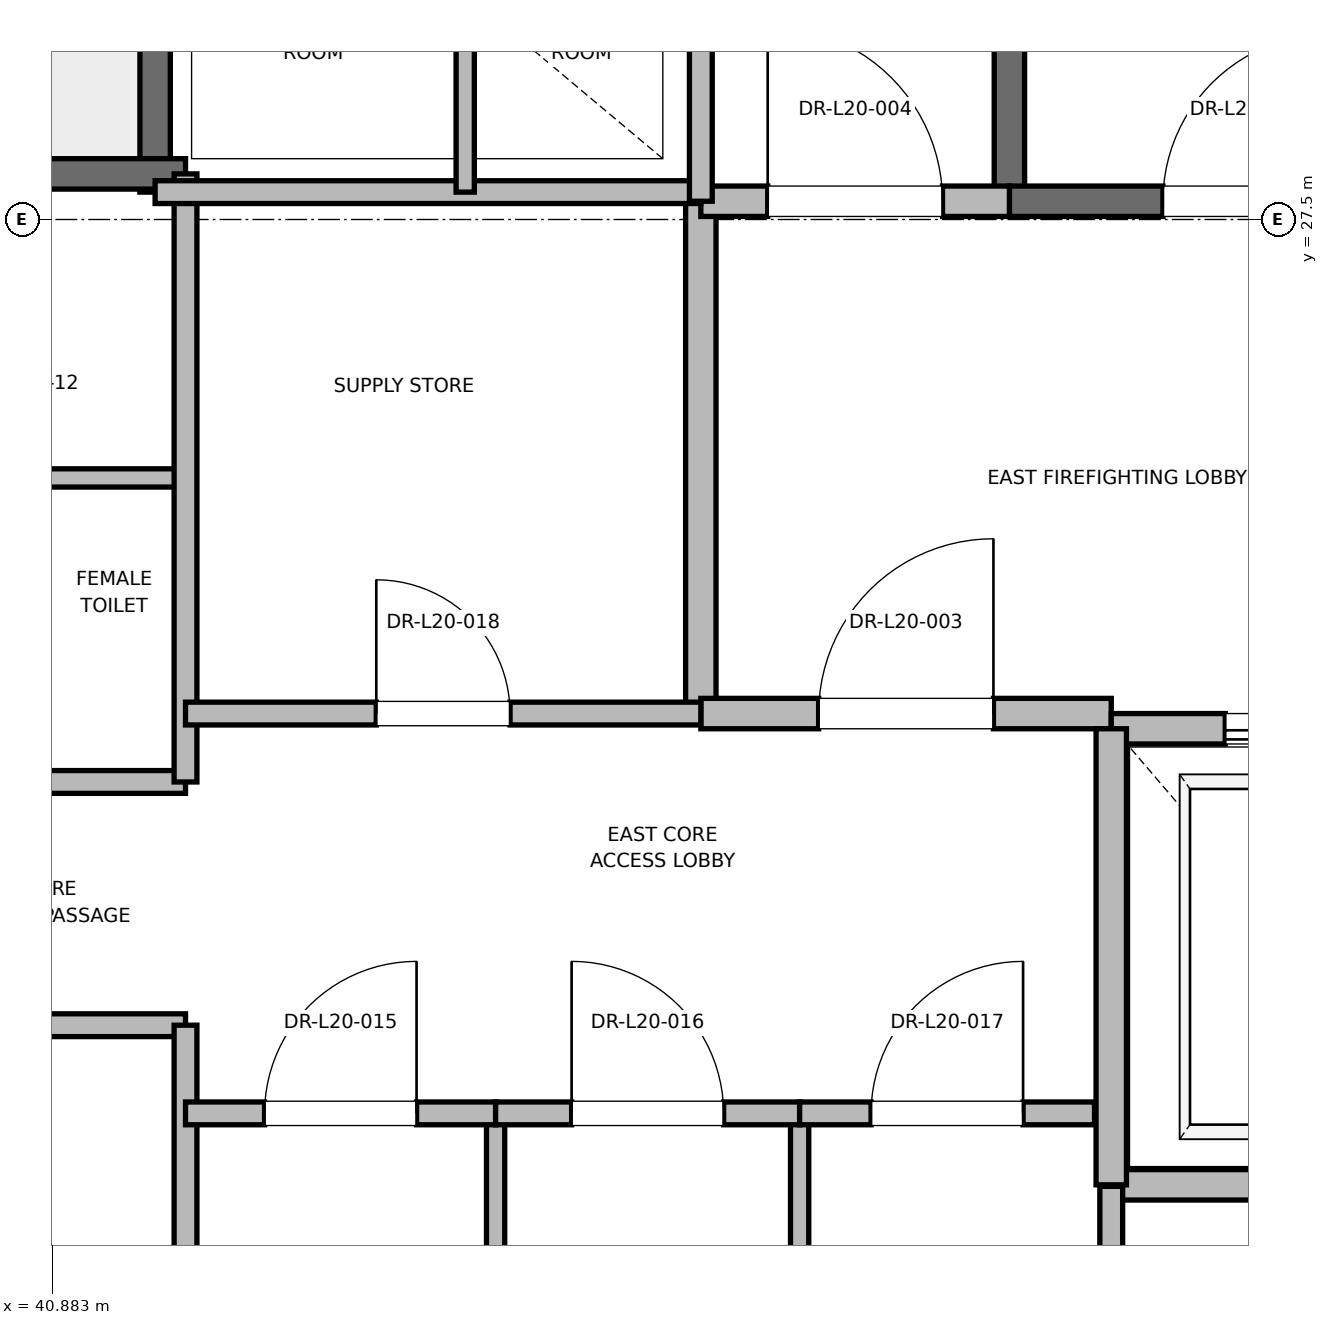
"""IFC4 building model, lengths in metres.
Left out: names, types, materials, properties, quantities, classifications, styles, units other than length and angle.
Written with IfcOpenShell. Run it as: python <this file> out.ifc"""

import sys

from ifc_helpers import new_model, si_unit, direction, frame, frame_2d, origin, place, context, subcontext, project, spatial, rectangle, extrude, element, fill, save


model = new_model("IFC4")
c1 = context("Model", 3, precision=1e-05, world=origin(), true_north=direction((0.0, 1.0)))
c2 = subcontext(c1, "Body", "Model", "MODEL_VIEW")
j1 = project(units=[si_unit("LENGTHUNIT", "METRE"), si_unit("PLANEANGLEUNIT", "RADIAN")], contexts=[c1])
p1 = place(None, origin())
s1 = spatial("IfcSite", under=j1, at=p1, CompositionType="ELEMENT")
p2 = place(p1, origin())
s2 = spatial("IfcBuilding", under=s1, at=p2, CompositionType="ELEMENT")
p3 = place(p2, frame((0.0, 0.0, 87.6)))
s3 = spatial("IfcBuildingStorey", under=s2, at=p3, CompositionType="ELEMENT", Elevation=87.6)
p4 = place(p3, frame((47.18, 27.62, 0.0), z_axis=(0.0, 0.0, 1.0), x_axis=(0.0, 1.0, 0.0)))
e1 = element("IfcWall", 1, at=p4, inside=s3, PredefinedType="SOLIDWALL", context=c2, shape_type="SweptSolid", body=[
    extrude(rectangle(XDim=8.18, YDim=0.2, at=frame_2d((4.09, 0.0))), origin(), (0.0, 0.0, 1.0), 3.76),
])
p5 = place(p3, frame((47.18, 27.62, 0.0), z_axis=(0.0, 0.0, 1.0), x_axis=(1.0, 0.0, 0.0)))
e2 = element("IfcWall", 2, at=p5, inside=s3, PredefinedType="SOLIDWALL", context=c2, shape_type="SweptSolid", body=[
    extrude(rectangle(XDim=3.12, YDim=0.2, at=frame_2d((1.56, 0.0))), origin(), (0.0, 0.0, 1.0), 3.76),
])
p6 = place(p5, frame((1.01, 0.0, 0.0)))
e3 = element("IfcOpeningElement", 3, at=p6, cuts=e2, PredefinedType="OPENING", context=c2, shape_type="SweptSolid", body=[
    extrude(rectangle(XDim=1.1, YDim=2.15, at=frame_2d((0.55, 1.075))), frame((0.0, 0.1, 0.0), z_axis=(0.0, -1.0, 0.0), x_axis=(1.0, 0.0, 0.0)), (0.0, 0.0, 1.0), 0.2),
])
p7 = place(p3, frame((41.56, 27.68, 0.0), z_axis=(0.0, 0.0, 1.0), x_axis=(0.0, 1.0, 0.0)))
e4 = element("IfcWall", 4, at=p7, inside=s3, PredefinedType="SOLIDWALL", context=c2, shape_type="SweptSolid", body=[
    extrude(rectangle(XDim=8.57, YDim=0.2, at=frame_2d((4.285, 0.0))), origin(), (0.0, 0.0, 1.0), 3.76),
])
p8 = place(p3, frame((38.44, 27.8, 0.0), z_axis=(0.0, 0.0, 1.0), x_axis=(1.0, 0.0, 0.0)))
e5 = element("IfcWall", 5, at=p8, inside=s3, PredefinedType="SOLIDWALL", context=c2, shape_type="SweptSolid", body=[
    extrude(rectangle(XDim=3.32, YDim=0.2, at=frame_2d((1.66, 0.0))), origin(), (0.0, 0.0, 1.0), 3.76),
])
p9 = place(p3, frame((45.15, 24.25, 0.0), z_axis=(0.0, 0.0, 1.0), x_axis=(0.0, 1.0, 0.0)))
e6 = element("IfcWall", 6, at=p9, inside=s3, PredefinedType="PARTITIONING", context=c2, shape_type="SweptSolid", body=[
    extrude(rectangle(XDim=3.37, YDim=0.2, at=frame_2d((1.685, 0.0))), origin(), (0.0, 0.0, 1.0), 3.76),
])
p10 = place(p3, frame((45.15, 24.25, 0.0), z_axis=(0.0, 0.0, 1.0), x_axis=(1.0, 0.0, 0.0)))
e7 = element("IfcWall", 7, at=p10, inside=s3, PredefinedType="PARTITIONING", context=c2, shape_type="SweptSolid", body=[
    extrude(rectangle(XDim=2.7, YDim=0.2, at=frame_2d((1.35, 0.0))), origin(), (0.0, 0.0, 1.0), 3.76),
])
p11 = place(p10, frame((0.775, 0.0, 0.0)))
e8 = element("IfcOpeningElement", 8, at=p11, cuts=e7, PredefinedType="OPENING", context=c2, shape_type="SweptSolid", body=[
    extrude(rectangle(XDim=1.15, YDim=2.2, at=frame_2d((0.575, 1.1))), frame((0.0, 0.1, 0.0), z_axis=(0.0, -1.0, 0.0), x_axis=(1.0, 0.0, 0.0)), (0.0, 0.0, 1.0), 0.2),
])
p12 = place(p3, frame((45.15, 27.62, 0.0), z_axis=(0.0, 0.0, 1.0), x_axis=(1.0, 0.0, 0.0)))
e9 = element("IfcWall", 9, at=p12, inside=s3, PredefinedType="PARTITIONING", context=c2, shape_type="SweptSolid", body=[
    extrude(rectangle(XDim=2.03, YDim=0.2, at=frame_2d((1.015, 0.0))), origin(), (0.0, 0.0, 1.0), 3.76),
])
p13 = place(p12, frame((0.44, 0.0, 0.0)))
e10 = element("IfcOpeningElement", 10, at=p13, cuts=e9, PredefinedType="OPENING", context=c2, shape_type="SweptSolid", body=[
    extrude(rectangle(XDim=1.15, YDim=2.2, at=frame_2d((0.575, 1.1))), frame((0.0, 0.1, 0.0), z_axis=(0.0, -1.0, 0.0), x_axis=(1.0, 0.0, 0.0)), (0.0, 0.0, 1.0), 0.2),
])
p14 = place(p3, frame((47.85, 21.15, 0.0), z_axis=(0.0, 0.0, 1.0), x_axis=(1.0, 0.0, 0.0)))
e11 = element("IfcWall", 11, at=p14, inside=s3, PredefinedType="SOLIDWALL", context=c2, shape_type="SweptSolid", body=[
    extrude(rectangle(XDim=2.6, YDim=0.2, at=frame_2d((1.3, 0.0))), origin(), (0.0, 0.0, 1.0), 3.76),
])
p15 = place(p3, frame((50.45, 24.15, 0.0), z_axis=(0.0, 0.0, 1.0), x_axis=(-1.0, 0.0, 0.0)))
e12 = element("IfcWall", 12, at=p15, inside=s3, PredefinedType="SOLIDWALL", context=c2, shape_type="SweptSolid", body=[
    extrude(rectangle(XDim=2.6, YDim=0.2, at=frame_2d((1.3, 0.0))), origin(), (0.0, 0.0, 1.0), 2.54),
])
p16 = place(p15, frame((0.75, 0.0, 0.0)))
e13 = element("IfcOpeningElement", 13, at=p16, cuts=e12, PredefinedType="OPENING", context=c2, shape_type="SweptSolid", body=[
    extrude(rectangle(XDim=1.1, YDim=2.2, at=frame_2d((0.55, 1.1))), frame((0.0, 0.1, 0.0), z_axis=(0.0, -1.0, 0.0), x_axis=(1.0, 0.0, 0.0)), (0.0, 0.0, 1.0), 0.2),
])
p17 = place(p3, frame((47.85, 24.15, 0.0), z_axis=(0.0, 0.0, 1.0), x_axis=(0.0, -1.0, 0.0)))
e14 = element("IfcWall", 14, at=p17, inside=s3, PredefinedType="SOLIDWALL", context=c2, shape_type="SweptSolid", body=[
    extrude(rectangle(XDim=3.0, YDim=0.2, at=frame_2d((1.5, 0.0))), origin(), (0.0, 0.0, 1.0), 3.76),
])
for number, where, z_axis, x_axis in (
    (15, (39.95, 22.2, 0.0), (0.0, 0.0, 1.0), (1.0, 0.0, 0.0)),
    (16, (39.95, 23.8, 0.0), (0.0, 0.0, 1.0), (1.0, 0.0, 0.0)),
):
    element("IfcWall", number, at=place(p3, frame(where, z_axis=z_axis, x_axis=x_axis)), inside=s3, PredefinedType="PARTITIONING", context=c2, shape_type="SweptSolid", body=[
        extrude(rectangle(XDim=1.81, YDim=0.15, at=frame_2d((0.905, 0.0))), origin(), (0.0, 0.0, 1.0), 2.85),
    ])
p18 = place(p3, frame((39.95, 25.8, 0.0), z_axis=(0.0, 0.0, 1.0), x_axis=(1.0, 0.0, 0.0)))
e17 = element("IfcWall", 17, at=p18, inside=s3, PredefinedType="PARTITIONING", context=c2, shape_type="SweptSolid", body=[
    extrude(rectangle(XDim=1.81, YDim=0.12, at=frame_2d((0.905, 0.0))), origin(), (0.0, 0.0, 1.0), 2.85),
])
p19 = place(p3, frame((41.76, 18.6, 0.0), z_axis=(0.0, 0.0, 1.0), x_axis=(0.0, 1.0, 0.0)))
e18 = element("IfcWall", 18, at=p19, inside=s3, PredefinedType="PARTITIONING", context=c2, shape_type="SweptSolid", body=[
    extrude(rectangle(XDim=3.6, YDim=0.15, at=frame_2d((1.8, 0.0))), origin(), (0.0, 0.0, 1.0), 2.54),
])
p20 = place(p3, frame((41.76, 23.8, 0.0), z_axis=(0.0, 0.0, 1.0), x_axis=(0.0, 1.0, 0.0)))
e19 = element("IfcWall", 19, at=p20, inside=s3, PredefinedType="PARTITIONING", context=c2, shape_type="SweptSolid", body=[
    extrude(rectangle(XDim=4.0, YDim=0.15, at=frame_2d((2.0, 0.0))), origin(), (0.0, 0.0, 1.0), 2.85),
])
p21 = place(p3, frame((41.56, 27.68, 0.0), z_axis=(0.0, 0.0, 1.0), x_axis=(1.0, 0.0, 0.0)))
e20 = element("IfcWall", 20, at=p21, inside=s3, PredefinedType="PARTITIONING", context=c2, shape_type="SweptSolid", body=[
    extrude(rectangle(XDim=3.59, YDim=0.15, at=frame_2d((1.795, 0.0))), origin(), (0.0, 0.0, 1.0), 2.85),
])
p22 = place(p3, frame((47.85, 18.6, 0.0), z_axis=(0.0, 0.0, 1.0), x_axis=(0.0, 1.0, 0.0)))
e21 = element("IfcWall", 21, at=p22, inside=s3, PredefinedType="PARTITIONING", context=c2, shape_type="SweptSolid", body=[
    extrude(rectangle(XDim=2.54, YDim=0.15, at=frame_2d((1.27, 0.0))), origin(), (0.0, 0.0, 1.0), 2.85),
])
for number, where, z_axis, x_axis in (
    (22, (43.8, 18.6, 0.0), (0.0, 0.0, 1.0), (0.0, 1.0, 0.0)),
    (23, (45.8, 18.6, 0.0), (0.0, 0.0, 1.0), (0.0, 1.0, 0.0)),
):
    element("IfcWall", number, at=place(p3, frame(where, z_axis=z_axis, x_axis=x_axis)), inside=s3, PredefinedType="PARTITIONING", context=c2, shape_type="SweptSolid", body=[
        extrude(rectangle(XDim=3.02, YDim=0.12, at=frame_2d((1.51, 0.0))), origin(), (0.0, 0.0, 1.0), 2.85),
    ])
p23 = place(p3, frame((41.76, 21.62, 0.0), z_axis=(0.0, 0.0, 1.0), x_axis=(1.0, 0.0, 0.0)))
e24 = element("IfcWall", 24, at=p23, inside=s3, PredefinedType="PARTITIONING", context=c2, shape_type="SweptSolid", body=[
    extrude(rectangle(XDim=2.04, YDim=0.15, at=frame_2d((1.02, 0.0))), origin(), (0.0, 0.0, 1.0), 2.85),
])
p24 = place(p23, frame((0.52, 0.0, 0.0)))
e25 = element("IfcOpeningElement", 25, at=p24, cuts=e24, PredefinedType="OPENING", context=c2, shape_type="SweptSolid", body=[
    extrude(rectangle(XDim=1.0, YDim=2.15, at=frame_2d((0.5, 1.075))), frame((0.0, 0.075, 0.0), z_axis=(0.0, -1.0, 0.0), x_axis=(1.0, 0.0, 0.0)), (0.0, 0.0, 1.0), 0.15),
])
p25 = place(p3, frame((43.8, 21.62, 0.0), z_axis=(0.0, 0.0, 1.0), x_axis=(1.0, 0.0, 0.0)))
e26 = element("IfcWall", 26, at=p25, inside=s3, PredefinedType="PARTITIONING", context=c2, shape_type="SweptSolid", body=[
    extrude(rectangle(XDim=2.0, YDim=0.15, at=frame_2d((1.0, 0.0))), origin(), (0.0, 0.0, 1.0), 2.85),
])
p26 = place(p25, frame((0.5, 0.0, 0.0)))
e27 = element("IfcOpeningElement", 27, at=p26, cuts=e26, PredefinedType="OPENING", context=c2, shape_type="SweptSolid", body=[
    extrude(rectangle(XDim=1.0, YDim=2.15, at=frame_2d((0.5, 1.075))), frame((0.0, 0.075, 0.0), z_axis=(0.0, -1.0, 0.0), x_axis=(1.0, 0.0, 0.0)), (0.0, 0.0, 1.0), 0.15),
])
p27 = place(p3, frame((45.8, 21.62, 0.0), z_axis=(0.0, 0.0, 1.0), x_axis=(1.0, 0.0, 0.0)))
e28 = element("IfcWall", 28, at=p27, inside=s3, PredefinedType="PARTITIONING", context=c2, shape_type="SweptSolid", body=[
    extrude(rectangle(XDim=1.94, YDim=0.15, at=frame_2d((0.97, 0.0))), origin(), (0.0, 0.0, 1.0), 2.85),
])
p28 = place(p27, frame((0.47, 0.0, 0.0)))
e29 = element("IfcOpeningElement", 29, at=p28, cuts=e28, PredefinedType="OPENING", context=c2, shape_type="SweptSolid", body=[
    extrude(rectangle(XDim=1.0, YDim=2.15, at=frame_2d((0.5, 1.075))), frame((0.0, 0.075, 0.0), z_axis=(0.0, -1.0, 0.0), x_axis=(1.0, 0.0, 0.0)), (0.0, 0.0, 1.0), 0.15),
])
p29 = place(p3, frame((41.76, 24.25, 0.0), z_axis=(0.0, 0.0, 1.0), x_axis=(1.0, 0.0, 0.0)))
e30 = element("IfcWall", 30, at=p29, inside=s3, PredefinedType="PARTITIONING", context=c2, shape_type="SweptSolid", body=[
    extrude(rectangle(XDim=3.39, YDim=0.15, at=frame_2d((1.695, 0.0))), origin(), (0.0, 0.0, 1.0), 2.85),
])
p30 = place(p29, frame((1.255, 0.0, 0.0)))
e31 = element("IfcOpeningElement", 31, at=p30, cuts=e30, PredefinedType="OPENING", context=c2, shape_type="SweptSolid", body=[
    extrude(rectangle(XDim=0.88, YDim=2.1, at=frame_2d((0.44, 1.05))), frame((0.0, 0.075, 0.0), z_axis=(0.0, -1.0, 0.0), x_axis=(1.0, 0.0, 0.0)), (0.0, 0.0, 1.0), 0.15),
])
p31 = place(p3, frame((45.15, 27.62, 0.0), z_axis=(0.0, 0.0, 1.0), x_axis=(0.0, 1.0, 0.0)))
e32 = element("IfcWall", 32, at=p31, inside=s3, PredefinedType="PARTITIONING", context=c2, shape_type="SweptSolid", body=[
    extrude(rectangle(XDim=3.1, YDim=0.15, at=frame_2d((1.55, 0.0))), origin(), (0.0, 0.0, 1.0), 2.85),
])
p32 = place(p3, frame((43.6, 27.68, 0.0), z_axis=(0.0, 0.0, 1.0), x_axis=(0.0, 1.0, 0.0)))
e33 = element("IfcWall", 33, at=p32, inside=s3, PredefinedType="PARTITIONING", context=c2, shape_type="SweptSolid", body=[
    extrude(rectangle(XDim=3.04, YDim=0.12, at=frame_2d((1.52, 0.0))), origin(), (0.0, 0.0, 1.0), 2.85),
])
p33 = place(p6, origin())
e34 = element("IfcDoor", 34, at=p33, inside=s3, OperationType="SINGLE_SWING_RIGHT", PredefinedType="DOOR", context=c2, shape_type="SweptSolid", body=[
    extrude(rectangle(XDim=1.1, YDim=2.15, at=frame_2d((0.55, 1.075))), frame((0.0, 0.025, 0.0), z_axis=(0.0, -1.0, 0.0), x_axis=(1.0, 0.0, 0.0)), (0.0, 0.0, 1.0), 0.05),
])
fill(e3, e34)
p34 = place(p11, origin())
e35 = element("IfcDoor", 35, at=p34, inside=s3, OperationType="SINGLE_SWING_RIGHT", PredefinedType="DOOR", context=c2, shape_type="SweptSolid", body=[
    extrude(rectangle(XDim=1.15, YDim=2.2, at=frame_2d((0.575, 1.1))), frame((0.0, 0.025, 0.0), z_axis=(0.0, -1.0, 0.0), x_axis=(1.0, 0.0, 0.0)), (0.0, 0.0, 1.0), 0.05),
])
fill(e8, e35)
p35 = place(p13, origin())
e36 = element("IfcDoor", 36, at=p35, inside=s3, OperationType="SINGLE_SWING_LEFT", PredefinedType="DOOR", context=c2, shape_type="SweptSolid", body=[
    extrude(rectangle(XDim=1.15, YDim=2.2, at=frame_2d((0.575, 1.1))), frame((0.0, 0.025, 0.0), z_axis=(0.0, -1.0, 0.0), x_axis=(1.0, 0.0, 0.0)), (0.0, 0.0, 1.0), 0.05),
])
fill(e10, e36)
p36 = place(p16, origin())
e37 = element("IfcDoor", 37, at=p36, inside=s3, OperationType="SLIDING_TO_RIGHT", PredefinedType="DOOR", context=c2, shape_type="SweptSolid", body=[
    extrude(rectangle(XDim=1.1, YDim=2.2, at=frame_2d((0.55, 1.1))), frame((0.0, 0.025, 0.0), z_axis=(0.0, -1.0, 0.0), x_axis=(1.0, 0.0, 0.0)), (0.0, 0.0, 1.0), 0.05),
])
fill(e13, e37)
p37 = place(p24, origin())
e38 = element("IfcDoor", 38, at=p37, inside=s3, OperationType="SINGLE_SWING_RIGHT", PredefinedType="DOOR", context=c2, shape_type="SweptSolid", body=[
    extrude(rectangle(XDim=1.0, YDim=2.15, at=frame_2d((0.5, 1.075))), frame((0.0, 0.025, 0.0), z_axis=(0.0, -1.0, 0.0), x_axis=(1.0, 0.0, 0.0)), (0.0, 0.0, 1.0), 0.05),
])
fill(e25, e38)
p38 = place(p26, origin())
e39 = element("IfcDoor", 39, at=p38, inside=s3, OperationType="SINGLE_SWING_LEFT", PredefinedType="DOOR", context=c2, shape_type="SweptSolid", body=[
    extrude(rectangle(XDim=1.0, YDim=2.15, at=frame_2d((0.5, 1.075))), frame((0.0, 0.025, 0.0), z_axis=(0.0, -1.0, 0.0), x_axis=(1.0, 0.0, 0.0)), (0.0, 0.0, 1.0), 0.05),
])
fill(e27, e39)
p39 = place(p28, origin())
e40 = element("IfcDoor", 40, at=p39, inside=s3, OperationType="SINGLE_SWING_RIGHT", PredefinedType="DOOR", context=c2, shape_type="SweptSolid", body=[
    extrude(rectangle(XDim=1.0, YDim=2.15, at=frame_2d((0.5, 1.075))), frame((0.0, 0.025, 0.0), z_axis=(0.0, -1.0, 0.0), x_axis=(1.0, 0.0, 0.0)), (0.0, 0.0, 1.0), 0.05),
])
fill(e29, e40)
p40 = place(p30, origin())
e41 = element("IfcDoor", 41, at=p40, inside=s3, OperationType="SINGLE_SWING_LEFT", PredefinedType="DOOR", context=c2, shape_type="SweptSolid", body=[
    extrude(rectangle(XDim=0.88, YDim=2.1, at=frame_2d((0.44, 1.05))), frame((0.0, 0.025, 0.0), z_axis=(0.0, -1.0, 0.0), x_axis=(1.0, 0.0, 0.0)), (0.0, 0.0, 1.0), 0.05),
])
fill(e31, e41)
save(model, sys.argv[1])
